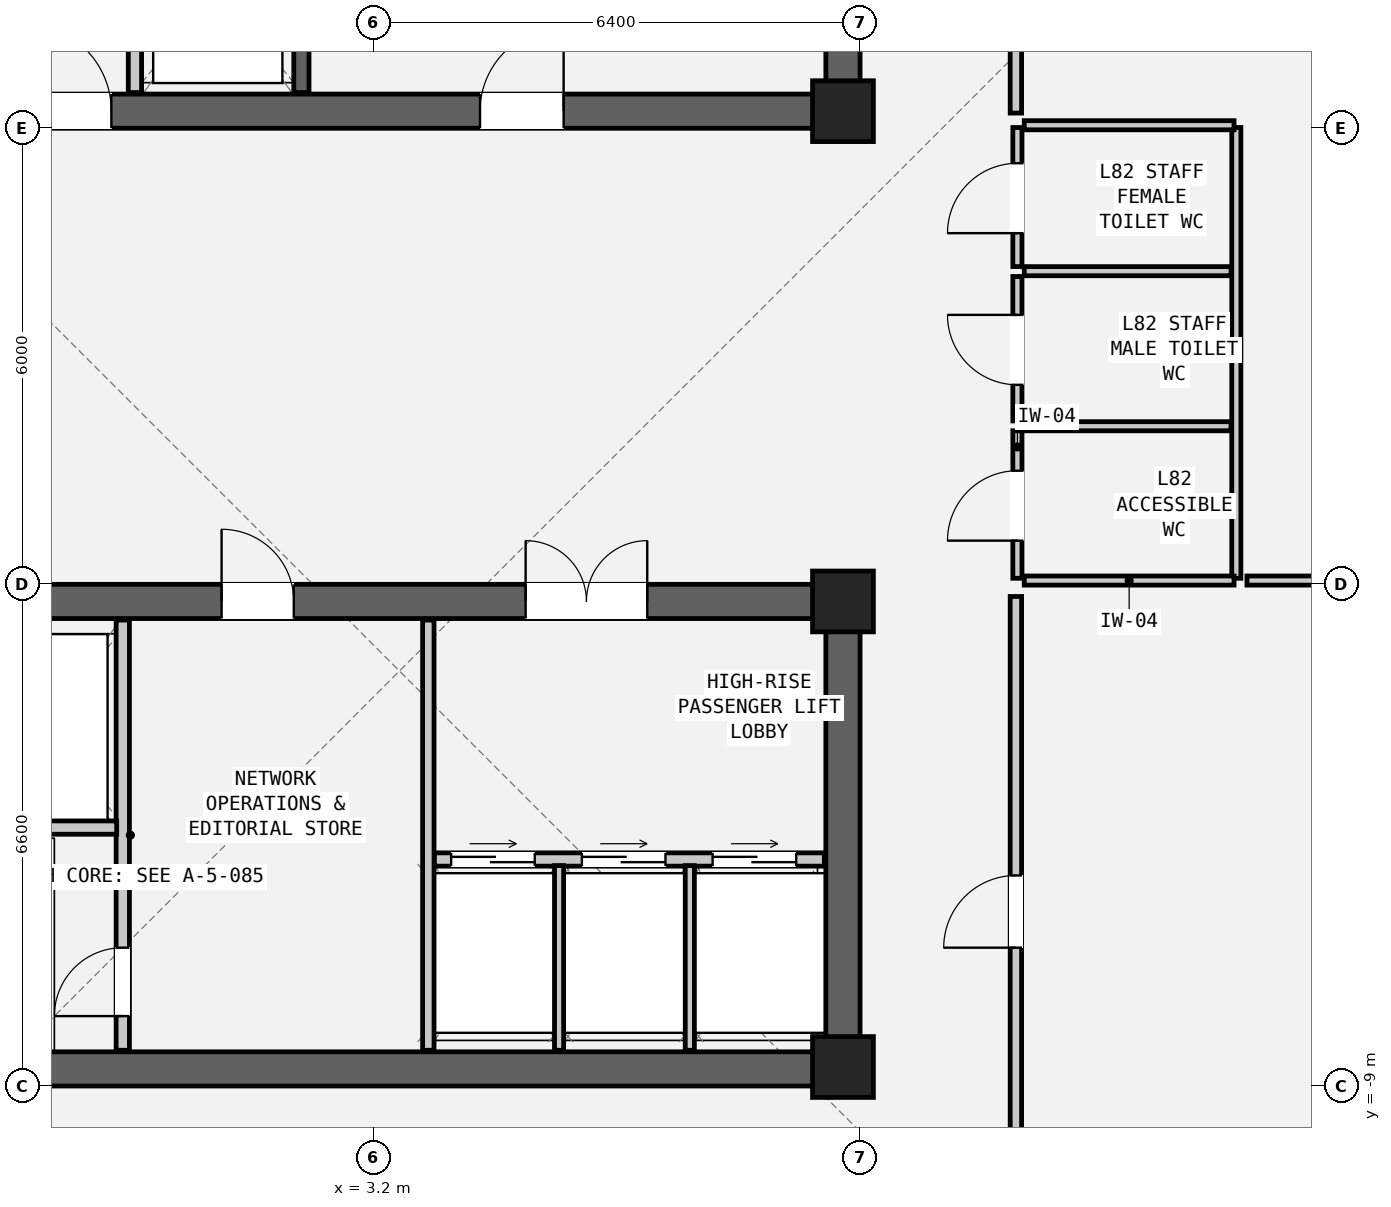
"""IFC4 building model, lengths in metres.
Left out: names, types, materials, properties, quantities, classifications, styles, units other than length and angle.
Written with IfcOpenShell. Run it as: python <this file> out.ifc"""

import sys

from ifc_helpers import new_model, si_unit, direction, frame, frame_2d, origin, origin_2d, place, context, subcontext, project, spatial, rectangle, extrude, element, fill, save


model = new_model("IFC4")
c1 = context("Model", 3, precision=1e-05, world=origin(), true_north=direction((0.0, 1.0)))
c2 = subcontext(c1, "Body", "Model", "MODEL_VIEW")
j1 = project(units=[si_unit("LENGTHUNIT", "METRE"), si_unit("PLANEANGLEUNIT", "RADIAN")], contexts=[c1])
p1 = place(None, origin())
s1 = spatial("IfcSite", under=j1, at=p1, CompositionType="ELEMENT")
p2 = place(p1, origin())
s2 = spatial("IfcBuilding", under=s1, at=p2, CompositionType="ELEMENT")
p3 = place(p2, frame((0.0, 0.0, 276.95)))
s3 = spatial("IfcBuildingStorey", under=s2, at=p3, CompositionType="ELEMENT", Elevation=276.95)
p4 = place(p3, frame((-9.6, 3.825, 0.0), z_axis=(0.0, 0.0, 1.0), x_axis=(1.0, 0.0, 0.0)))
e1 = element("IfcWall", 1, at=p4, inside=s3, PredefinedType="SHEAR", context=c2, shape_type="SweptSolid", body=[
    extrude(rectangle(XDim=19.2, YDim=0.45, at=frame_2d((9.6, 0.0))), origin(), (0.0, 0.0, 1.0), 3.6),
])
p5 = place(p4, frame((14.2, 0.0, 0.0)))
e2 = element("IfcOpeningElement", 2, at=p5, cuts=e1, PredefinedType="OPENING", context=c2, shape_type="SweptSolid", body=[
    extrude(rectangle(XDim=1.1, YDim=2.08, at=frame_2d((0.55, 1.04))), frame((0.0, 0.237, 0.0), z_axis=(0.0, -1.0, 0.0), x_axis=(1.0, 0.0, 0.0)), (0.0, 0.0, 1.0), 0.474),
])
p6 = place(p4, frame((8.2, 0.0, 0.0)))
e3 = element("IfcOpeningElement", 3, at=p6, cuts=e1, PredefinedType="OPENING", context=c2, shape_type="SweptSolid", body=[
    extrude(rectangle(XDim=1.15, YDim=2.1, at=frame_2d((0.575, 1.05))), frame((0.0, 0.237, 0.0), z_axis=(0.0, -1.0, 0.0), x_axis=(1.0, 0.0, 0.0)), (0.0, 0.0, 1.0), 0.474),
])
p7 = place(p4, frame((2.5, 0.0, 0.0)))
e4 = element("IfcOpeningElement", 4, at=p7, cuts=e1, PredefinedType="OPENING", context=c2, shape_type="SweptSolid", body=[
    extrude(rectangle(XDim=1.2, YDim=2.1, at=frame_2d((0.6, 1.05))), frame((0.0, 0.237, 0.0), z_axis=(0.0, -1.0, 0.0), x_axis=(1.0, 0.0, 0.0)), (0.0, 0.0, 1.0), 0.474),
])
p8 = place(p3, frame((9.375, 3.6, 0.0), z_axis=(0.0, 0.0, 1.0), x_axis=(0.0, 1.0, 0.0)))
e5 = element("IfcWall", 5, at=p8, inside=s3, PredefinedType="SHEAR", context=c2, shape_type="SweptSolid", body=[
    extrude(rectangle(XDim=6.6, YDim=0.45, at=frame_2d((3.3, 0.0))), origin(), (0.0, 0.0, 1.0), 3.6),
])
p9 = place(p3, frame((-9.6, -8.775, 0.0), z_axis=(0.0, 0.0, 1.0), x_axis=(1.0, 0.0, 0.0)))
e6 = element("IfcWall", 6, at=p9, inside=s3, PredefinedType="SHEAR", context=c2, shape_type="SweptSolid", body=[
    extrude(rectangle(XDim=19.2, YDim=0.45, at=frame_2d((9.6, 0.0))), origin(), (0.0, 0.0, 1.0), 3.6),
])
p10 = place(p3, frame((-9.6, -2.625, 0.0), z_axis=(0.0, 0.0, 1.0), x_axis=(1.0, 0.0, 0.0)))
e7 = element("IfcWall", 7, at=p10, inside=s3, PredefinedType="SHEAR", context=c2, shape_type="SweptSolid", body=[
    extrude(rectangle(XDim=19.2, YDim=0.45, at=frame_2d((9.6, 0.0))), origin(), (0.0, 0.0, 1.0), 3.6),
])
p11 = place(p10, frame((3.8, 0.0, 0.0)))
e8 = element("IfcOpeningElement", 8, at=p11, cuts=e7, PredefinedType="OPENING", context=c2, shape_type="SweptSolid", body=[
    extrude(rectangle(XDim=1.1, YDim=2.08, at=frame_2d((0.55, 1.04))), frame((0.0, 0.237, 0.0), z_axis=(0.0, -1.0, 0.0), x_axis=(1.0, 0.0, 0.0)), (0.0, 0.0, 1.0), 0.474),
])
p12 = place(p10, frame((10.8, 0.0, 0.0)))
e9 = element("IfcOpeningElement", 9, at=p12, cuts=e7, PredefinedType="OPENING", context=c2, shape_type="SweptSolid", body=[
    extrude(rectangle(XDim=0.95, YDim=2.1, at=frame_2d((0.475, 1.05))), frame((0.0, 0.237, 0.0), z_axis=(0.0, -1.0, 0.0), x_axis=(1.0, 0.0, 0.0)), (0.0, 0.0, 1.0), 0.474),
])
p13 = place(p10, frame((14.8, 0.0, 0.0)))
e10 = element("IfcOpeningElement", 10, at=p13, cuts=e7, PredefinedType="OPENING", context=c2, shape_type="SweptSolid", body=[
    extrude(rectangle(XDim=1.6, YDim=2.12, at=frame_2d((0.8, 1.06))), frame((0.0, 0.237, 0.0), z_axis=(0.0, -1.0, 0.0), x_axis=(1.0, 0.0, 0.0)), (0.0, 0.0, 1.0), 0.474),
])
p14 = place(p3, frame((9.375, -9.0, 0.0), z_axis=(0.0, 0.0, 1.0), x_axis=(0.0, 1.0, 0.0)))
e11 = element("IfcWall", 11, at=p14, inside=s3, PredefinedType="SHEAR", context=c2, shape_type="SweptSolid", body=[
    extrude(rectangle(XDim=6.6, YDim=0.45, at=frame_2d((3.3, 0.0))), origin(), (0.0, 0.0, 1.0), 3.6),
])
for number, where, z_axis, x_axis in (
    (12, (9.375, 3.825, 0.0), (0.0, 0.0, 1.0), (1.0, 0.0, 0.0)),
    (13, (9.375, -2.625, 0.0), (0.0, 0.0, 1.0), (1.0, 0.0, 0.0)),
    (14, (9.375, -8.75, 0.0), (0.0, 0.0, 1.0), (1.0, 0.0, 0.0)),
):
    element("IfcColumn", number, at=place(p3, frame(where, z_axis=z_axis, x_axis=x_axis)), inside=s3, PredefinedType="COLUMN", context=c2, shape_type="SweptSolid", body=[
        extrude(rectangle(XDim=0.8, YDim=0.8, at=origin_2d()), origin(), (0.0, 0.0, 1.0), 3.6),
    ])
p15 = place(p3, frame((2.25, 4.07, 0.0), z_axis=(0.0, 0.0, 1.0), x_axis=(0.0, 1.0, 0.0)))
e15 = element("IfcWall", 15, at=p15, inside=s3, PredefinedType="SHEAR", context=c2, shape_type="SweptSolid", body=[
    extrude(rectangle(XDim=5.66, YDim=0.2, at=frame_2d((2.83, 0.0))), origin(), (0.0, 0.0, 1.0), 3.41),
])
p16 = place(p15, frame((0.65, 0.0, 0.0)))
e16 = element("IfcOpeningElement", 16, at=p16, cuts=e15, PredefinedType="OPENING", context=c2, shape_type="SweptSolid", body=[
    extrude(rectangle(XDim=1.15, YDim=2.08, at=frame_2d((0.575, 1.04))), frame((0.0, 0.112, 0.0), z_axis=(0.0, -1.0, 0.0), x_axis=(1.0, 0.0, 0.0)), (0.0, 0.0, 1.0), 0.224),
])
p17 = place(p3, frame((0.06, 4.07, 0.0), z_axis=(0.0, 0.0, 1.0), x_axis=(0.0, 1.0, 0.0)))
e17 = element("IfcWall", 17, at=p17, inside=s3, PredefinedType="PARTITIONING", context=c2, shape_type="SweptSolid", body=[
    extrude(rectangle(XDim=5.66, YDim=0.175, at=frame_2d((2.83, 0.0))), origin(), (0.0, 0.0, 1.0), 3.41),
])
p18 = place(p17, frame((3.15, 0.0, 0.0)))
e18 = element("IfcOpeningElement", 18, at=p18, cuts=e17, PredefinedType="OPENING", context=c2, shape_type="SweptSolid", body=[
    extrude(rectangle(XDim=1.4, YDim=2.12, at=frame_2d((0.7, 1.06))), frame((0.0, 0.1, 0.0), z_axis=(0.0, -1.0, 0.0), x_axis=(1.0, 0.0, 0.0)), (0.0, 0.0, 1.0), 0.199),
])
p19 = place(p3, frame((-0.1, -8.53, 0.0), z_axis=(0.0, 0.0, 1.0), x_axis=(0.0, 1.0, 0.0)))
e19 = element("IfcWall", 19, at=p19, inside=s3, PredefinedType="PARTITIONING", context=c2, shape_type="SweptSolid", body=[
    extrude(rectangle(XDim=5.66, YDim=0.175, at=frame_2d((2.83, 0.0))), origin(), (0.0, 0.0, 1.0), 3.41),
])
p20 = place(p19, frame((0.45, 0.0, 0.0)))
e20 = element("IfcOpeningElement", 20, at=p20, cuts=e19, PredefinedType="OPENING", context=c2, shape_type="SweptSolid", body=[
    extrude(rectangle(XDim=0.9, YDim=2.05, at=frame_2d((0.45, 1.025))), frame((0.0, 0.1, 0.0), z_axis=(0.0, -1.0, 0.0), x_axis=(1.0, 0.0, 0.0)), (0.0, 0.0, 1.0), 0.199),
])
p21 = place(p3, frame((-2.15, -5.6, 0.0), z_axis=(0.0, 0.0, 1.0), x_axis=(1.0, 0.0, 0.0)))
e21 = element("IfcWall", 21, at=p21, inside=s3, PredefinedType="PARTITIONING", context=c2, shape_type="SweptSolid", body=[
    extrude(rectangle(XDim=1.97, YDim=0.175, at=frame_2d((0.985, 0.0))), origin(), (0.0, 0.0, 1.0), 3.41),
])
p22 = place(p3, frame((3.92, -8.53, 0.0), z_axis=(0.0, 0.0, 1.0), x_axis=(0.0, 1.0, 0.0)))
e22 = element("IfcWall", 22, at=p22, inside=s3, PredefinedType="PARTITIONING", context=c2, shape_type="SweptSolid", body=[
    extrude(rectangle(XDim=5.66, YDim=0.15, at=frame_2d((2.83, 0.0))), origin(), (0.0, 0.0, 1.0), 3.41),
])
p23 = place(p3, frame((4.0, -6.02, 0.0), z_axis=(0.0, 0.0, 1.0), x_axis=(1.0, 0.0, 0.0)))
e23 = element("IfcWall", 23, at=p23, inside=s3, PredefinedType="PARTITIONING", context=c2, shape_type="SweptSolid", body=[
    extrude(rectangle(XDim=5.13, YDim=0.175, at=frame_2d((2.565, 0.0))), origin(), (0.0, 0.0, 1.0), 3.41),
])
p24 = place(p23, frame((0.22, 0.0, 0.0)))
e24 = element("IfcOpeningElement", 24, at=p24, cuts=e23, PredefinedType="OPENING", context=c2, shape_type="SweptSolid", body=[
    extrude(rectangle(XDim=1.1, YDim=2.06, at=frame_2d((0.55, 1.03))), frame((0.0, 0.1, 0.0), z_axis=(0.0, -1.0, 0.0), x_axis=(1.0, 0.0, 0.0)), (0.0, 0.0, 1.0), 0.199),
])
p25 = place(p23, frame((1.94, 0.0, 0.0)))
e25 = element("IfcOpeningElement", 25, at=p25, cuts=e23, PredefinedType="OPENING", context=c2, shape_type="SweptSolid", body=[
    extrude(rectangle(XDim=1.1, YDim=2.06, at=frame_2d((0.55, 1.03))), frame((0.0, 0.1, 0.0), z_axis=(0.0, -1.0, 0.0), x_axis=(1.0, 0.0, 0.0)), (0.0, 0.0, 1.0), 0.199),
])
p26 = place(p23, frame((3.66, 0.0, 0.0)))
e26 = element("IfcOpeningElement", 26, at=p26, cuts=e23, PredefinedType="OPENING", context=c2, shape_type="SweptSolid", body=[
    extrude(rectangle(XDim=1.1, YDim=2.06, at=frame_2d((0.55, 1.03))), frame((0.0, 0.1, 0.0), z_axis=(0.0, -1.0, 0.0), x_axis=(1.0, 0.0, 0.0)), (0.0, 0.0, 1.0), 0.199),
])
for number, where, z_axis, x_axis in (
    (27, (5.64, -8.53, 0.0), (0.0, 0.0, 1.0), (0.0, 1.0, 0.0)),
    (28, (7.36, -8.53, 0.0), (0.0, 0.0, 1.0), (0.0, 1.0, 0.0)),
):
    element("IfcWall", number, at=place(p3, frame(where, z_axis=z_axis, x_axis=x_axis)), inside=s3, PredefinedType="PARTITIONING", context=c2, shape_type="SweptSolid", body=[
        extrude(rectangle(XDim=2.43, YDim=0.12, at=frame_2d((1.215, 0.0))), origin(), (0.0, 0.0, 1.0), 3.41),
    ])
p27 = place(p3, frame((11.67, -2.32, 0.0), z_axis=(0.0, 0.0, 1.0), x_axis=(0.0, 1.0, 0.0)))
e29 = element("IfcWall", 29, at=p27, inside=s3, PredefinedType="PARTITIONING", context=c2, shape_type="SweptSolid", body=[
    extrude(rectangle(XDim=1.94, YDim=0.12, at=frame_2d((0.97, 0.0))), origin(), (0.0, 0.0, 1.0), 3.41),
])
p28 = place(p27, frame((0.495, 0.0, 0.0)))
e30 = element("IfcOpeningElement", 30, at=p28, cuts=e29, PredefinedType="OPENING", context=c2, shape_type="SweptSolid", body=[
    extrude(rectangle(XDim=0.92, YDim=2.1, at=frame_2d((0.46, 1.05))), frame((0.0, 0.072, 0.0), z_axis=(0.0, -1.0, 0.0), x_axis=(1.0, 0.0, 0.0)), (0.0, 0.0, 1.0), 0.144),
])
p29 = place(p3, frame((11.67, -0.25, 0.0), z_axis=(0.0, 0.0, 1.0), x_axis=(0.0, 1.0, 0.0)))
e31 = element("IfcWall", 31, at=p29, inside=s3, PredefinedType="PARTITIONING", context=c2, shape_type="SweptSolid", body=[
    extrude(rectangle(XDim=1.9, YDim=0.12, at=frame_2d((0.95, 0.0))), origin(), (0.0, 0.0, 1.0), 3.41),
])
p30 = place(p29, frame((0.475, 0.0, 0.0)))
e32 = element("IfcOpeningElement", 32, at=p30, cuts=e31, PredefinedType="OPENING", context=c2, shape_type="SweptSolid", body=[
    extrude(rectangle(XDim=0.92, YDim=2.1, at=frame_2d((0.46, 1.05))), frame((0.0, 0.072, 0.0), z_axis=(0.0, -1.0, 0.0), x_axis=(1.0, 0.0, 0.0)), (0.0, 0.0, 1.0), 0.144),
])
p31 = place(p3, frame((11.67, 1.78, 0.0), z_axis=(0.0, 0.0, 1.0), x_axis=(0.0, 1.0, 0.0)))
e33 = element("IfcWall", 33, at=p31, inside=s3, PredefinedType="PARTITIONING", context=c2, shape_type="SweptSolid", body=[
    extrude(rectangle(XDim=1.83, YDim=0.12, at=frame_2d((0.915, 0.0))), origin(), (0.0, 0.0, 1.0), 3.41),
])
p32 = place(p31, frame((0.44, 0.0, 0.0)))
e34 = element("IfcOpeningElement", 34, at=p32, cuts=e33, PredefinedType="OPENING", context=c2, shape_type="SweptSolid", body=[
    extrude(rectangle(XDim=0.92, YDim=2.1, at=frame_2d((0.46, 1.05))), frame((0.0, 0.072, 0.0), z_axis=(0.0, -1.0, 0.0), x_axis=(1.0, 0.0, 0.0)), (0.0, 0.0, 1.0), 0.144),
])
p33 = place(p3, frame((14.55, -2.32, 0.0), z_axis=(0.0, 0.0, 1.0), x_axis=(0.0, 1.0, 0.0)))
e35 = element("IfcWall", 35, at=p33, inside=s3, PredefinedType="PARTITIONING", context=c2, shape_type="SweptSolid", body=[
    extrude(rectangle(XDim=5.93, YDim=0.12, at=frame_2d((2.965, 0.0))), origin(), (0.0, 0.0, 1.0), 3.41),
])
for number, where, z_axis, x_axis in (
    (36, (11.76, -2.35, 0.0), (0.0, 0.0, 1.0), (1.0, 0.0, 0.0)),
    (37, (11.76, 3.64, 0.0), (0.0, 0.0, 1.0), (1.0, 0.0, 0.0)),
):
    element("IfcWall", number, at=place(p3, frame(where, z_axis=z_axis, x_axis=x_axis)), inside=s3, PredefinedType="PARTITIONING", context=c2, shape_type="SweptSolid", body=[
        extrude(rectangle(XDim=2.76, YDim=0.12, at=frame_2d((1.38, 0.0))), origin(), (0.0, 0.0, 1.0), 2.61),
    ])
for number, where, z_axis, x_axis in (
    (38, (11.76, -0.32, 0.0), (0.0, 0.0, 1.0), (1.0, 0.0, 0.0)),
    (39, (11.76, 1.72, 0.0), (0.0, 0.0, 1.0), (1.0, 0.0, 0.0)),
):
    element("IfcWall", number, at=place(p3, frame(where, z_axis=z_axis, x_axis=x_axis)), inside=s3, PredefinedType="PARTITIONING", context=c2, shape_type="SweptSolid", body=[
        extrude(rectangle(XDim=2.72, YDim=0.12, at=frame_2d((1.36, 0.0))), origin(), (0.0, 0.0, 1.0), 3.41),
    ])
p34 = place(p3, frame((14.69, -2.35, 0.0), z_axis=(0.0, 0.0, 1.0), x_axis=(1.0, 0.0, 0.0)))
e40 = element("IfcWall", 40, at=p34, inside=s3, PredefinedType="PARTITIONING", context=c2, shape_type="SweptSolid", body=[
    extrude(rectangle(XDim=6.927, YDim=0.12, at=frame_2d((3.464, 0.0))), origin(), (0.0, 0.0, 1.0), 2.61),
])
p35 = place(p3, frame((11.65, -10.85, 0.0), z_axis=(0.0, 0.0, 1.0), x_axis=(0.0, 1.0, 0.0)))
e41 = element("IfcWall", 41, at=p35, inside=s3, PredefinedType="PARTITIONING", context=c2, shape_type="SweptSolid", body=[
    extrude(rectangle(XDim=8.29, YDim=0.15, at=frame_2d((4.145, 0.0))), origin(), (0.0, 0.0, 1.0), 3.41),
])
p36 = place(p35, frame((3.67, 0.0, 0.0)))
e42 = element("IfcOpeningElement", 42, at=p36, cuts=e41, PredefinedType="OPENING", context=c2, shape_type="SweptSolid", body=[
    extrude(rectangle(XDim=0.95, YDim=2.1, at=frame_2d((0.475, 1.05))), frame((0.0, 0.087, 0.0), z_axis=(0.0, -1.0, 0.0), x_axis=(1.0, 0.0, 0.0)), (0.0, 0.0, 1.0), 0.174),
])
p37 = place(p3, frame((11.65, 3.8, 0.0), z_axis=(0.0, 0.0, 1.0), x_axis=(0.0, 1.0, 0.0)))
e43 = element("IfcWall", 43, at=p37, inside=s3, PredefinedType="PARTITIONING", context=c2, shape_type="SweptSolid", body=[
    extrude(rectangle(XDim=8.25, YDim=0.15, at=frame_2d((4.125, 0.0))), origin(), (0.0, 0.0, 1.0), 3.41),
])
p38 = place(p37, frame((3.525, 0.0, 0.0)))
e44 = element("IfcOpeningElement", 44, at=p38, cuts=e43, PredefinedType="OPENING", context=c2, shape_type="SweptSolid", body=[
    extrude(rectangle(XDim=1.2, YDim=2.1, at=frame_2d((0.6, 1.05))), frame((0.0, 0.087, 0.0), z_axis=(0.0, -1.0, 0.0), x_axis=(1.0, 0.0, 0.0)), (0.0, 0.0, 1.0), 0.174),
])
p39 = place(p5, origin())
e45 = element("IfcDoor", 45, at=p39, inside=s3, OperationType="SINGLE_SWING_RIGHT", PredefinedType="DOOR", context=c2, shape_type="SweptSolid", body=[
    extrude(rectangle(XDim=1.1, YDim=2.08, at=frame_2d((0.55, 1.04))), frame((0.0, 0.025, 0.0), z_axis=(0.0, -1.0, 0.0), x_axis=(1.0, 0.0, 0.0)), (0.0, 0.0, 1.0), 0.05),
])
fill(e2, e45)
p40 = place(p6, origin())
e46 = element("IfcDoor", 46, at=p40, inside=s3, OperationType="SINGLE_SWING_LEFT", PredefinedType="DOOR", context=c2, shape_type="SweptSolid", body=[
    extrude(rectangle(XDim=1.15, YDim=2.1, at=frame_2d((0.575, 1.05))), frame((0.0, 0.025, 0.0), z_axis=(0.0, -1.0, 0.0), x_axis=(1.0, 0.0, 0.0)), (0.0, 0.0, 1.0), 0.05),
])
fill(e3, e46)
p41 = place(p20, origin())
e47 = element("IfcDoor", 47, at=p41, inside=s3, OperationType="SINGLE_SWING_LEFT", PredefinedType="DOOR", context=c2, shape_type="SweptSolid", body=[
    extrude(rectangle(XDim=0.9, YDim=2.05, at=frame_2d((0.45, 1.025))), frame((0.0, 0.025, 0.0), z_axis=(0.0, -1.0, 0.0), x_axis=(1.0, 0.0, 0.0)), (0.0, 0.0, 1.0), 0.05),
])
fill(e20, e47)
p42 = place(p12, origin())
e48 = element("IfcDoor", 48, at=p42, inside=s3, OperationType="SINGLE_SWING_LEFT", PredefinedType="DOOR", context=c2, shape_type="SweptSolid", body=[
    extrude(rectangle(XDim=0.95, YDim=2.1, at=frame_2d((0.475, 1.05))), frame((0.0, 0.025, 0.0), z_axis=(0.0, -1.0, 0.0), x_axis=(1.0, 0.0, 0.0)), (0.0, 0.0, 1.0), 0.05),
])
fill(e9, e48)
p43 = place(p24, origin())
e49 = element("IfcDoor", 49, at=p43, inside=s3, OperationType="DOUBLE_DOOR_SLIDING", PredefinedType="DOOR", context=c2, shape_type="SweptSolid", body=[
    extrude(rectangle(XDim=1.1, YDim=2.06, at=frame_2d((0.55, 1.03))), frame((0.0, 0.025, 0.0), z_axis=(0.0, -1.0, 0.0), x_axis=(1.0, 0.0, 0.0)), (0.0, 0.0, 1.0), 0.05),
])
fill(e24, e49)
p44 = place(p25, origin())
e50 = element("IfcDoor", 50, at=p44, inside=s3, OperationType="DOUBLE_DOOR_SLIDING", PredefinedType="DOOR", context=c2, shape_type="SweptSolid", body=[
    extrude(rectangle(XDim=1.1, YDim=2.06, at=frame_2d((0.55, 1.03))), frame((0.0, 0.025, 0.0), z_axis=(0.0, -1.0, 0.0), x_axis=(1.0, 0.0, 0.0)), (0.0, 0.0, 1.0), 0.05),
])
fill(e25, e50)
p45 = place(p26, origin())
e51 = element("IfcDoor", 51, at=p45, inside=s3, OperationType="DOUBLE_DOOR_SLIDING", PredefinedType="DOOR", context=c2, shape_type="SweptSolid", body=[
    extrude(rectangle(XDim=1.1, YDim=2.06, at=frame_2d((0.55, 1.03))), frame((0.0, 0.025, 0.0), z_axis=(0.0, -1.0, 0.0), x_axis=(1.0, 0.0, 0.0)), (0.0, 0.0, 1.0), 0.05),
])
fill(e26, e51)
p46 = place(p13, origin())
e52 = element("IfcDoor", 52, at=p46, inside=s3, OperationType="DOUBLE_DOOR_SINGLE_SWING", PredefinedType="DOOR", context=c2, shape_type="SweptSolid", body=[
    extrude(rectangle(XDim=1.6, YDim=2.12, at=frame_2d((0.8, 1.06))), frame((0.0, 0.025, 0.0), z_axis=(0.0, -1.0, 0.0), x_axis=(1.0, 0.0, 0.0)), (0.0, 0.0, 1.0), 0.05),
])
fill(e10, e52)
p47 = place(p28, origin())
e53 = element("IfcDoor", 53, at=p47, inside=s3, OperationType="SINGLE_SWING_LEFT", PredefinedType="DOOR", context=c2, shape_type="SweptSolid", body=[
    extrude(rectangle(XDim=0.92, YDim=2.1, at=frame_2d((0.46, 1.05))), frame((0.0, 0.025, 0.0), z_axis=(0.0, -1.0, 0.0), x_axis=(1.0, 0.0, 0.0)), (0.0, 0.0, 1.0), 0.05),
])
fill(e30, e53)
p48 = place(p30, origin())
e54 = element("IfcDoor", 54, at=p48, inside=s3, OperationType="SINGLE_SWING_RIGHT", PredefinedType="DOOR", context=c2, shape_type="SweptSolid", body=[
    extrude(rectangle(XDim=0.92, YDim=2.1, at=frame_2d((0.46, 1.05))), frame((0.0, 0.025, 0.0), z_axis=(0.0, -1.0, 0.0), x_axis=(1.0, 0.0, 0.0)), (0.0, 0.0, 1.0), 0.05),
])
fill(e32, e54)
p49 = place(p32, origin())
e55 = element("IfcDoor", 55, at=p49, inside=s3, OperationType="SINGLE_SWING_LEFT", PredefinedType="DOOR", context=c2, shape_type="SweptSolid", body=[
    extrude(rectangle(XDim=0.92, YDim=2.1, at=frame_2d((0.46, 1.05))), frame((0.0, 0.025, 0.0), z_axis=(0.0, -1.0, 0.0), x_axis=(1.0, 0.0, 0.0)), (0.0, 0.0, 1.0), 0.05),
])
fill(e34, e55)
p50 = place(p36, origin())
e56 = element("IfcDoor", 56, at=p50, inside=s3, OperationType="SINGLE_SWING_LEFT", PredefinedType="DOOR", context=c2, shape_type="SweptSolid", body=[
    extrude(rectangle(XDim=0.95, YDim=2.1, at=frame_2d((0.475, 1.05))), frame((0.0, 0.025, 0.0), z_axis=(0.0, -1.0, 0.0), x_axis=(1.0, 0.0, 0.0)), (0.0, 0.0, 1.0), 0.05),
])
fill(e42, e56)
save(model, sys.argv[1])
